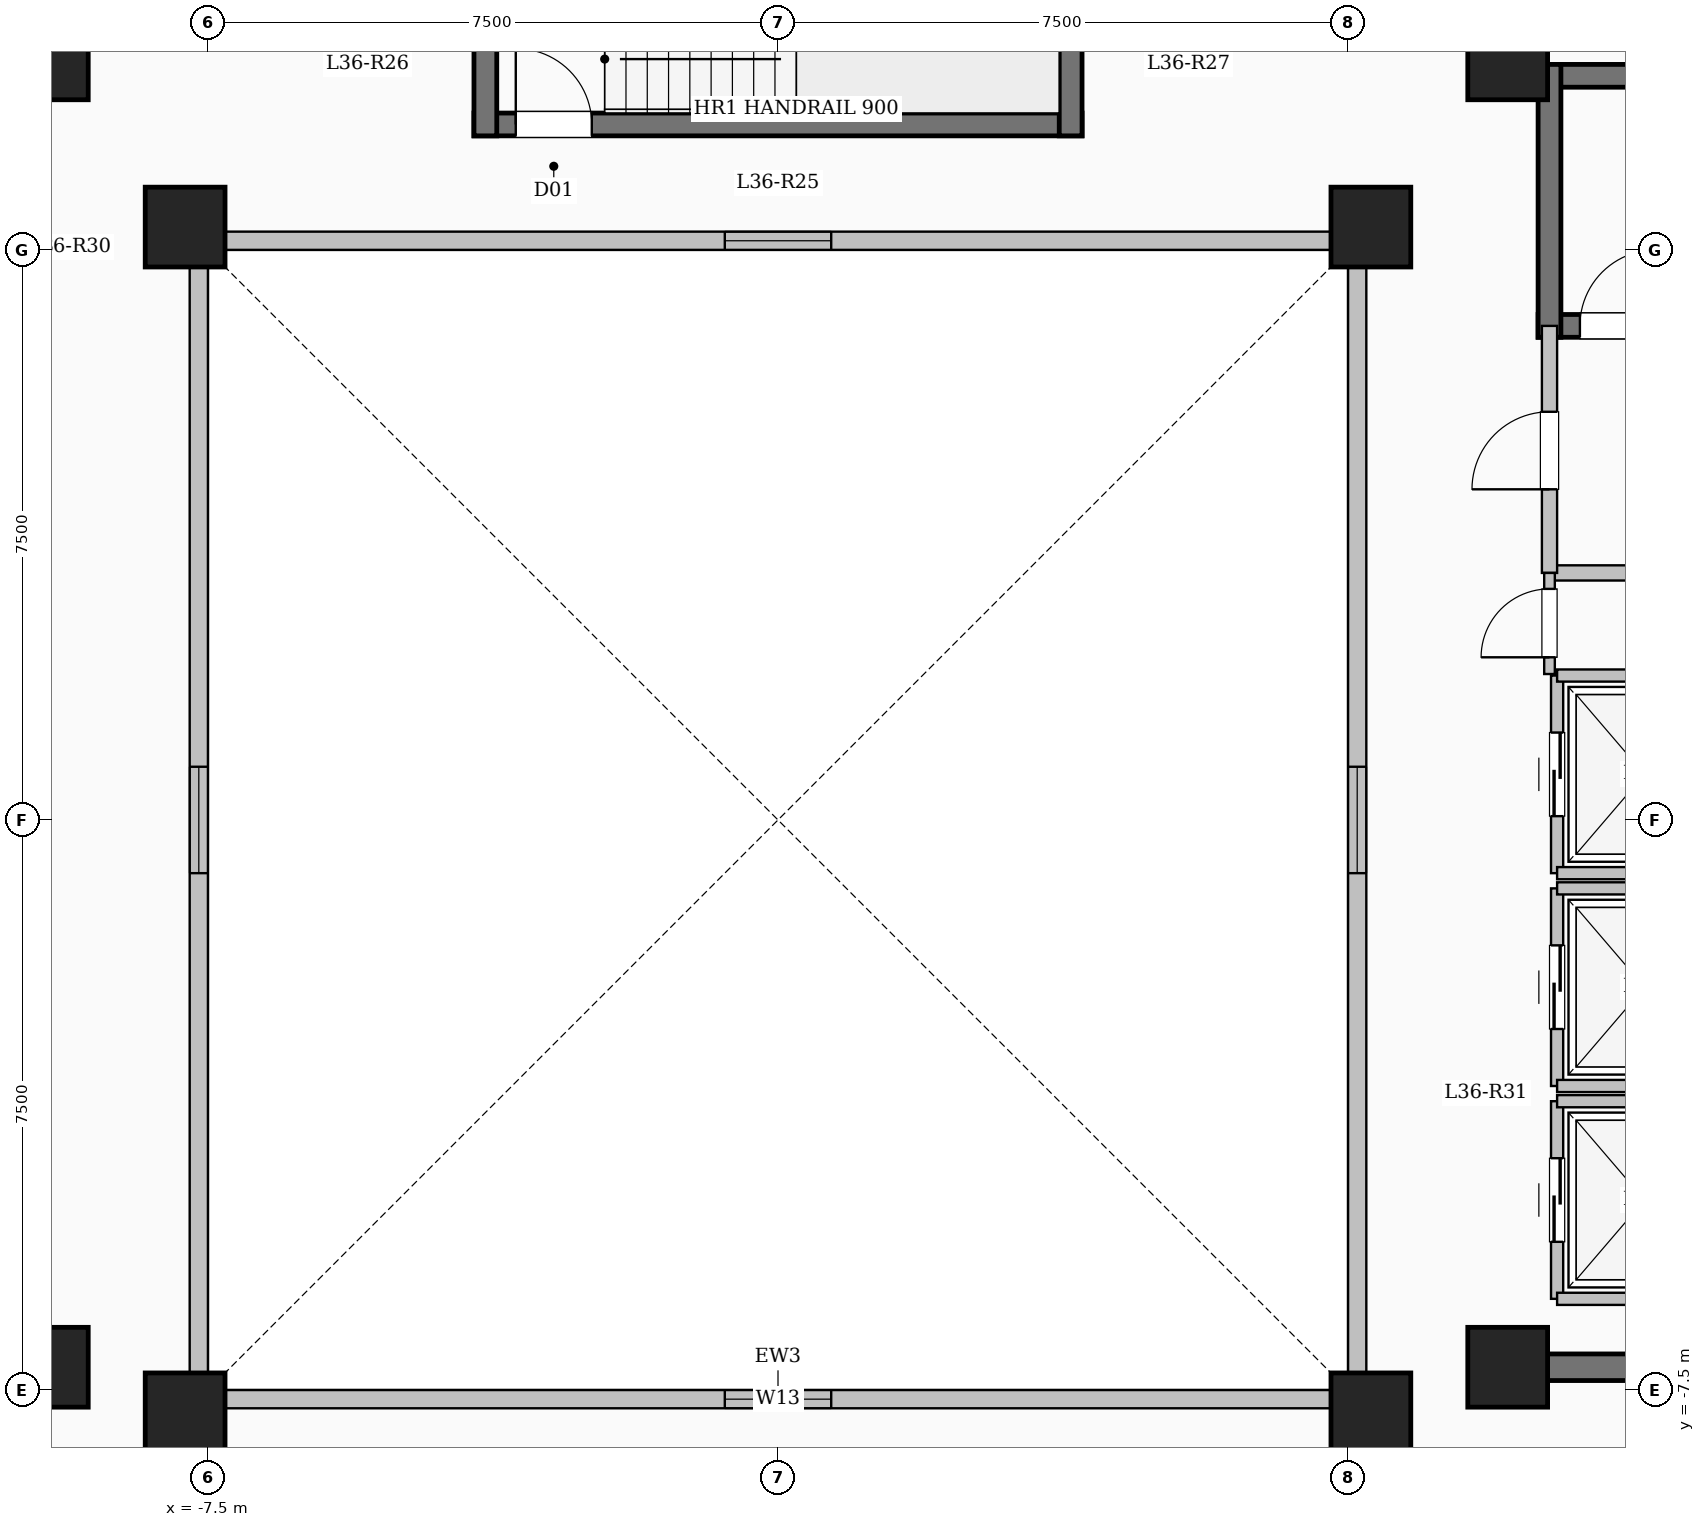
"""IFC4 building model, lengths in metres.
Left out: names, types, materials, properties, quantities, classifications, styles, units other than length and angle.
Written with IfcOpenShell. Run it as: python <this file> out.ifc"""

import sys

from ifc_helpers import new_model, si_unit, direction, frame, frame_2d, origin, origin_2d, place, context, subcontext, project, spatial, rectangle, extrude, element, fill, save


model = new_model("IFC4")
c1 = context("Model", 3, precision=1e-05, world=origin(), true_north=direction((0.0, 1.0)))
c2 = subcontext(c1, "Body", "Model", "MODEL_VIEW")
j1 = project(units=[si_unit("LENGTHUNIT", "METRE"), si_unit("PLANEANGLEUNIT", "RADIAN")], contexts=[c1])
p1 = place(None, origin())
s1 = spatial("IfcSite", under=j1, at=p1, CompositionType="ELEMENT")
p2 = place(p1, origin())
s2 = spatial("IfcBuilding", under=s1, at=p2, CompositionType="ELEMENT")
p3 = place(p2, frame((0.0, 0.0, 135.95)))
s3 = spatial("IfcBuildingStorey", under=s2, at=p3, CompositionType="ELEMENT", Elevation=135.95)
for number, where, z_axis, x_axis in (
    (1, (-7.8, -7.8, 0.0), (0.0, 0.0, 1.0), (1.0, 0.0, 0.0)),
    (2, (7.8, -7.8, 0.0), (0.0, 0.0, 1.0), (1.0, 0.0, 0.0)),
    (3, (-7.8, 7.8, 0.0), (0.0, 0.0, 1.0), (1.0, 0.0, 0.0)),
    (4, (7.8, 7.8, 0.0), (0.0, 0.0, 1.0), (1.0, 0.0, 0.0)),
    (5, (-9.6, -7.2, 0.0), (0.0, 0.0, 1.0), (1.0, 0.0, 0.0)),
    (6, (-9.6, 10.0, 0.0), (0.0, 0.0, 1.0), (1.0, 0.0, 0.0)),
    (7, (9.6, -7.2, 0.0), (0.0, 0.0, 1.0), (1.0, 0.0, 0.0)),
    (8, (9.6, 10.0, 0.0), (0.0, 0.0, 1.0), (1.0, 0.0, 0.0)),
):
    element("IfcColumn", number, at=place(p3, frame(where, z_axis=z_axis, x_axis=x_axis)), inside=s3, PredefinedType="COLUMN", context=c2, shape_type="SweptSolid", body=[
        extrude(rectangle(XDim=1.05, YDim=1.05, at=origin_2d()), origin(), (0.0, 0.0, 1.0), 3.35),
    ])
p4 = place(p3, frame((-7.62, -7.62, 0.0), z_axis=(0.0, 0.0, 1.0), x_axis=(1.0, 0.0, 0.0)))
e9 = element("IfcWall", 9, at=p4, inside=s3, PredefinedType="SOLIDWALL", context=c2, shape_type="SweptSolid", body=[
    extrude(rectangle(XDim=15.24, YDim=0.24, at=frame_2d((7.62, 0.0))), origin(), (0.0, 0.0, 1.0), 3.1),
])
p5 = place(p4, frame((6.92, 0.0, 0.95)))
e10 = element("IfcOpeningElement", 10, at=p5, cuts=e9, PredefinedType="OPENING", context=c2, shape_type="SweptSolid", body=[
    extrude(rectangle(XDim=1.4, YDim=1.5, at=frame_2d((0.7, 0.75))), frame((0.0, 0.13, 0.0), z_axis=(0.0, -1.0, 0.0), x_axis=(1.0, 0.0, 0.0)), (0.0, 0.0, 1.0), 0.26),
])
p6 = place(p3, frame((7.62, -7.62, 0.0), z_axis=(0.0, 0.0, 1.0), x_axis=(0.0, 1.0, 0.0)))
e11 = element("IfcWall", 11, at=p6, inside=s3, PredefinedType="SOLIDWALL", context=c2, shape_type="SweptSolid", body=[
    extrude(rectangle(XDim=15.24, YDim=0.24, at=frame_2d((7.62, 0.0))), origin(), (0.0, 0.0, 1.0), 3.1),
])
p7 = place(p6, frame((6.92, 0.0, 0.95)))
e12 = element("IfcOpeningElement", 12, at=p7, cuts=e11, PredefinedType="OPENING", context=c2, shape_type="SweptSolid", body=[
    extrude(rectangle(XDim=1.4, YDim=1.5, at=frame_2d((0.7, 0.75))), frame((0.0, 0.13, 0.0), z_axis=(0.0, -1.0, 0.0), x_axis=(1.0, 0.0, 0.0)), (0.0, 0.0, 1.0), 0.26),
])
p8 = place(p3, frame((7.62, 7.62, 0.0), z_axis=(0.0, 0.0, 1.0), x_axis=(-1.0, 0.0, 0.0)))
e13 = element("IfcWall", 13, at=p8, inside=s3, PredefinedType="SOLIDWALL", context=c2, shape_type="SweptSolid", body=[
    extrude(rectangle(XDim=15.24, YDim=0.24, at=frame_2d((7.62, 0.0))), origin(), (0.0, 0.0, 1.0), 3.1),
])
p9 = place(p8, frame((6.92, 0.0, 0.95)))
e14 = element("IfcOpeningElement", 14, at=p9, cuts=e13, PredefinedType="OPENING", context=c2, shape_type="SweptSolid", body=[
    extrude(rectangle(XDim=1.4, YDim=1.5, at=frame_2d((0.7, 0.75))), frame((0.0, 0.13, 0.0), z_axis=(0.0, -1.0, 0.0), x_axis=(1.0, 0.0, 0.0)), (0.0, 0.0, 1.0), 0.26),
])
p10 = place(p3, frame((-7.62, 7.62, 0.0), z_axis=(0.0, 0.0, 1.0), x_axis=(0.0, -1.0, 0.0)))
e15 = element("IfcWall", 15, at=p10, inside=s3, PredefinedType="SOLIDWALL", context=c2, shape_type="SweptSolid", body=[
    extrude(rectangle(XDim=15.24, YDim=0.24, at=frame_2d((7.62, 0.0))), origin(), (0.0, 0.0, 1.0), 3.1),
])
p11 = place(p10, frame((6.92, 0.0, 0.95)))
e16 = element("IfcOpeningElement", 16, at=p11, cuts=e15, PredefinedType="OPENING", context=c2, shape_type="SweptSolid", body=[
    extrude(rectangle(XDim=1.4, YDim=1.5, at=frame_2d((0.7, 0.75))), frame((0.0, 0.13, 0.0), z_axis=(0.0, -1.0, 0.0), x_axis=(1.0, 0.0, 0.0)), (0.0, 0.0, 1.0), 0.26),
])
p12 = place(p3, frame((10.0, 9.79, 0.0), z_axis=(0.0, 0.0, 1.0), x_axis=(1.0, 0.0, 0.0)))
e17 = element("IfcWall", 17, at=p12, inside=s3, PredefinedType="SHEAR", context=c2, shape_type="SweptSolid", body=[
    extrude(rectangle(XDim=8.0, YDim=0.3, at=frame_2d((4.0, 0.0))), origin(), (0.0, 0.0, 1.0), 3.35),
])
p13 = place(p3, frame((10.0, 6.5, 0.0), z_axis=(0.0, 0.0, 1.0), x_axis=(1.0, 0.0, 0.0)))
e18 = element("IfcWall", 18, at=p13, inside=s3, PredefinedType="SHEAR", context=c2, shape_type="SweptSolid", body=[
    extrude(rectangle(XDim=8.0, YDim=0.3, at=frame_2d((4.0, 0.0))), origin(), (0.0, 0.0, 1.0), 3.35),
])
p14 = place(p13, frame((0.55, 0.0, 0.0)))
e19 = element("IfcOpeningElement", 19, at=p14, cuts=e18, PredefinedType="OPENING", context=c2, shape_type="SweptSolid", body=[
    extrude(rectangle(XDim=1.0, YDim=2.15, at=frame_2d((0.5, 1.075))), frame((0.0, 0.16, 0.0), z_axis=(0.0, -1.0, 0.0), x_axis=(1.0, 0.0, 0.0)), (0.0, 0.0, 1.0), 0.32),
])
p15 = place(p3, frame((10.15, 6.35, 0.0), z_axis=(0.0, 0.0, 1.0), x_axis=(0.0, 1.0, 0.0)))
e20 = element("IfcWall", 20, at=p15, inside=s3, PredefinedType="SHEAR", context=c2, shape_type="SweptSolid", body=[
    extrude(rectangle(XDim=3.59, YDim=0.3, at=frame_2d((1.795, 0.0))), origin(), (0.0, 0.0, 1.0), 3.35),
])
p16 = place(p3, frame((-4.0, 9.15, 0.0), z_axis=(0.0, 0.0, 1.0), x_axis=(1.0, 0.0, 0.0)))
e21 = element("IfcWall", 21, at=p16, inside=s3, PredefinedType="SHEAR", context=c2, shape_type="SweptSolid", body=[
    extrude(rectangle(XDim=8.0, YDim=0.3, at=frame_2d((4.0, 0.0))), origin(), (0.0, 0.0, 1.0), 3.35),
])
p17 = place(p16, frame((0.55, 0.0, 0.0)))
e22 = element("IfcOpeningElement", 22, at=p17, cuts=e21, PredefinedType="OPENING", context=c2, shape_type="SweptSolid", body=[
    extrude(rectangle(XDim=1.0, YDim=2.15, at=frame_2d((0.5, 1.075))), frame((0.0, 0.16, 0.0), z_axis=(0.0, -1.0, 0.0), x_axis=(1.0, 0.0, 0.0)), (0.0, 0.0, 1.0), 0.32),
])
for number, where, z_axis, x_axis in (
    (23, (-3.85, 9.0, 0.0), (0.0, 0.0, 1.0), (0.0, 1.0, 0.0)),
    (24, (3.85, 9.0, 0.0), (0.0, 0.0, 1.0), (0.0, 1.0, 0.0)),
):
    element("IfcWall", number, at=place(p3, frame(where, z_axis=z_axis, x_axis=x_axis)), inside=s3, PredefinedType="SHEAR", context=c2, shape_type="SweptSolid", body=[
        extrude(rectangle(XDim=3.59, YDim=0.3, at=frame_2d((1.795, 0.0))), origin(), (0.0, 0.0, 1.0), 3.35),
    ])
p18 = place(p3, frame((10.15, 3.25, 0.0), z_axis=(0.0, 0.0, 1.0), x_axis=(1.0, 0.0, 0.0)))
e25 = element("IfcWall", 25, at=p18, inside=s3, PredefinedType="SOLIDWALL", context=c2, shape_type="SweptSolid", body=[
    extrude(rectangle(XDim=5.4, YDim=0.2, at=frame_2d((2.7, 0.0))), origin(), (0.0, 0.0, 1.0), 3.1),
])
p19 = place(p3, frame((10.15, 3.25, 0.0), z_axis=(0.0, 0.0, 1.0), x_axis=(0.0, 1.0, 0.0)))
e26 = element("IfcWall", 26, at=p19, inside=s3, PredefinedType="SOLIDWALL", context=c2, shape_type="SweptSolid", body=[
    extrude(rectangle(XDim=3.25, YDim=0.2, at=frame_2d((1.625, 0.0))), origin(), (0.0, 0.0, 1.0), 3.1),
])
p20 = place(p19, frame((1.1, 0.0, 0.0)))
e27 = element("IfcOpeningElement", 27, at=p20, cuts=e26, PredefinedType="OPENING", context=c2, shape_type="SweptSolid", body=[
    extrude(rectangle(XDim=1.02, YDim=2.15, at=frame_2d((0.51, 1.075))), frame((0.0, 0.11, 0.0), z_axis=(0.0, -1.0, 0.0), x_axis=(1.0, 0.0, 0.0)), (0.0, 0.0, 1.0), 0.22),
])
p21 = place(p3, frame((10.25, -6.3, 0.0), z_axis=(0.0, 0.0, 1.0), x_axis=(0.0, 1.0, 0.0)))
e28 = element("IfcWall", 28, at=p21, inside=s3, PredefinedType="SOLIDWALL", context=c2, shape_type="SweptSolid", body=[
    extrude(rectangle(XDim=2.6, YDim=0.16, at=frame_2d((1.3, 0.0))), origin(), (0.0, 0.0, 1.0), 3.1),
])
p22 = place(p21, frame((0.75, 0.0, 0.0)))
e29 = element("IfcOpeningElement", 29, at=p22, cuts=e28, PredefinedType="OPENING", context=c2, shape_type="SweptSolid", body=[
    extrude(rectangle(XDim=1.1, YDim=2.15, at=frame_2d((0.55, 1.075))), frame((0.0, 0.09, 0.0), z_axis=(0.0, -1.0, 0.0), x_axis=(1.0, 0.0, 0.0)), (0.0, 0.0, 1.0), 0.18),
])
for number, where, z_axis, x_axis in (
    (30, (10.25, -6.3, 0.0), (0.0, 0.0, 1.0), (1.0, 0.0, 0.0)),
    (31, (10.25, -3.7, 0.0), (0.0, 0.0, 1.0), (1.0, 0.0, 0.0)),
):
    element("IfcWall", number, at=place(p3, frame(where, z_axis=z_axis, x_axis=x_axis)), inside=s3, PredefinedType="SOLIDWALL", context=c2, shape_type="SweptSolid", body=[
        extrude(rectangle(XDim=2.3, YDim=0.16, at=frame_2d((1.15, 0.0))), origin(), (0.0, 0.0, 1.0), 3.1),
    ])
p23 = place(p3, frame((10.25, -3.5, 0.0), z_axis=(0.0, 0.0, 1.0), x_axis=(0.0, 1.0, 0.0)))
e32 = element("IfcWall", 32, at=p23, inside=s3, PredefinedType="SOLIDWALL", context=c2, shape_type="SweptSolid", body=[
    extrude(rectangle(XDim=2.6, YDim=0.16, at=frame_2d((1.3, 0.0))), origin(), (0.0, 0.0, 1.0), 3.1),
])
p24 = place(p23, frame((0.75, 0.0, 0.0)))
e33 = element("IfcOpeningElement", 33, at=p24, cuts=e32, PredefinedType="OPENING", context=c2, shape_type="SweptSolid", body=[
    extrude(rectangle(XDim=1.1, YDim=2.15, at=frame_2d((0.55, 1.075))), frame((0.0, 0.09, 0.0), z_axis=(0.0, -1.0, 0.0), x_axis=(1.0, 0.0, 0.0)), (0.0, 0.0, 1.0), 0.18),
])
for number, where, z_axis, x_axis in (
    (34, (10.25, -3.5, 0.0), (0.0, 0.0, 1.0), (1.0, 0.0, 0.0)),
    (35, (10.25, -0.9, 0.0), (0.0, 0.0, 1.0), (1.0, 0.0, 0.0)),
):
    element("IfcWall", number, at=place(p3, frame(where, z_axis=z_axis, x_axis=x_axis)), inside=s3, PredefinedType="SOLIDWALL", context=c2, shape_type="SweptSolid", body=[
        extrude(rectangle(XDim=2.3, YDim=0.16, at=frame_2d((1.15, 0.0))), origin(), (0.0, 0.0, 1.0), 3.1),
    ])
p25 = place(p3, frame((10.25, -0.7, 0.0), z_axis=(0.0, 0.0, 1.0), x_axis=(0.0, 1.0, 0.0)))
e36 = element("IfcWall", 36, at=p25, inside=s3, PredefinedType="SOLIDWALL", context=c2, shape_type="SweptSolid", body=[
    extrude(rectangle(XDim=2.6, YDim=0.16, at=frame_2d((1.3, 0.0))), origin(), (0.0, 0.0, 1.0), 3.1),
])
p26 = place(p25, frame((0.75, 0.0, 0.0)))
e37 = element("IfcOpeningElement", 37, at=p26, cuts=e36, PredefinedType="OPENING", context=c2, shape_type="SweptSolid", body=[
    extrude(rectangle(XDim=1.1, YDim=2.15, at=frame_2d((0.55, 1.075))), frame((0.0, 0.09, 0.0), z_axis=(0.0, -1.0, 0.0), x_axis=(1.0, 0.0, 0.0)), (0.0, 0.0, 1.0), 0.18),
])
for number, where, z_axis, x_axis in (
    (38, (10.25, -0.7, 0.0), (0.0, 0.0, 1.0), (1.0, 0.0, 0.0)),
    (39, (10.25, 1.9, 0.0), (0.0, 0.0, 1.0), (1.0, 0.0, 0.0)),
):
    element("IfcWall", number, at=place(p3, frame(where, z_axis=z_axis, x_axis=x_axis)), inside=s3, PredefinedType="SOLIDWALL", context=c2, shape_type="SweptSolid", body=[
        extrude(rectangle(XDim=2.3, YDim=0.16, at=frame_2d((1.15, 0.0))), origin(), (0.0, 0.0, 1.0), 3.1),
    ])
p27 = place(p3, frame((10.075, -7.2, 0.0), z_axis=(0.0, 0.0, 1.0), x_axis=(1.0, 0.0, 0.0)))
e40 = element("IfcWall", 40, at=p27, inside=s3, PredefinedType="SHEAR", context=c2, shape_type="SweptSolid", body=[
    extrude(rectangle(XDim=8.55, YDim=0.35, at=frame_2d((4.275, 0.0))), origin(), (0.0, 0.0, 1.0), 3.35),
])
p28 = place(p3, frame((10.15, 1.92, 0.0), z_axis=(0.0, 0.0, 1.0), x_axis=(0.0, 1.0, 0.0)))
e41 = element("IfcWall", 41, at=p28, inside=s3, PredefinedType="PARTITIONING", context=c2, shape_type="SweptSolid", body=[
    extrude(rectangle(XDim=1.33, YDim=0.14, at=frame_2d((0.665, 0.0))), origin(), (0.0, 0.0, 1.0), 3.1),
])
p29 = place(p28, frame((0.22, 0.0, 0.0)))
e42 = element("IfcOpeningElement", 42, at=p29, cuts=e41, PredefinedType="OPENING", context=c2, shape_type="SweptSolid", body=[
    extrude(rectangle(XDim=0.9, YDim=2.08, at=frame_2d((0.45, 1.04))), frame((0.0, 0.08, 0.0), z_axis=(0.0, -1.0, 0.0), x_axis=(1.0, 0.0, 0.0)), (0.0, 0.0, 1.0), 0.16),
])
p30 = place(p5, origin())
e43 = element("IfcWindow", 43, at=p30, inside=s3, PartitioningType="SINGLE_PANEL", PredefinedType="WINDOW", context=c2, shape_type="SweptSolid", body=[
    extrude(rectangle(XDim=1.4, YDim=1.5, at=frame_2d((0.7, 0.75))), frame((0.0, 0.03, 0.0), z_axis=(0.0, -1.0, 0.0), x_axis=(1.0, 0.0, 0.0)), (0.0, 0.0, 1.0), 0.06),
])
fill(e10, e43)
p31 = place(p7, origin())
e44 = element("IfcWindow", 44, at=p31, inside=s3, PartitioningType="SINGLE_PANEL", PredefinedType="WINDOW", context=c2, shape_type="SweptSolid", body=[
    extrude(rectangle(XDim=1.4, YDim=1.5, at=frame_2d((0.7, 0.75))), frame((0.0, 0.03, 0.0), z_axis=(0.0, -1.0, 0.0), x_axis=(1.0, 0.0, 0.0)), (0.0, 0.0, 1.0), 0.06),
])
fill(e12, e44)
p32 = place(p9, origin())
e45 = element("IfcWindow", 45, at=p32, inside=s3, PartitioningType="SINGLE_PANEL", PredefinedType="WINDOW", context=c2, shape_type="SweptSolid", body=[
    extrude(rectangle(XDim=1.4, YDim=1.5, at=frame_2d((0.7, 0.75))), frame((0.0, 0.03, 0.0), z_axis=(0.0, -1.0, 0.0), x_axis=(1.0, 0.0, 0.0)), (0.0, 0.0, 1.0), 0.06),
])
fill(e14, e45)
p33 = place(p11, origin())
e46 = element("IfcWindow", 46, at=p33, inside=s3, PartitioningType="SINGLE_PANEL", PredefinedType="WINDOW", context=c2, shape_type="SweptSolid", body=[
    extrude(rectangle(XDim=1.4, YDim=1.5, at=frame_2d((0.7, 0.75))), frame((0.0, 0.03, 0.0), z_axis=(0.0, -1.0, 0.0), x_axis=(1.0, 0.0, 0.0)), (0.0, 0.0, 1.0), 0.06),
])
fill(e16, e46)
p34 = place(p14, origin())
e47 = element("IfcDoor", 47, at=p34, inside=s3, OperationType="SINGLE_SWING_RIGHT", PredefinedType="DOOR", context=c2, shape_type="SweptSolid", body=[
    extrude(rectangle(XDim=1.0, YDim=2.15, at=frame_2d((0.5, 1.075))), frame((0.0, 0.025, 0.0), z_axis=(0.0, -1.0, 0.0), x_axis=(1.0, 0.0, 0.0)), (0.0, 0.0, 1.0), 0.05),
])
fill(e19, e47)
p35 = place(p17, origin())
e48 = element("IfcDoor", 48, at=p35, inside=s3, OperationType="SINGLE_SWING_LEFT", PredefinedType="DOOR", context=c2, shape_type="SweptSolid", body=[
    extrude(rectangle(XDim=1.0, YDim=2.15, at=frame_2d((0.5, 1.075))), frame((0.0, 0.025, 0.0), z_axis=(0.0, -1.0, 0.0), x_axis=(1.0, 0.0, 0.0)), (0.0, 0.0, 1.0), 0.05),
])
fill(e22, e48)
p36 = place(p20, origin())
e49 = element("IfcDoor", 49, at=p36, inside=s3, OperationType="SINGLE_SWING_LEFT", PredefinedType="DOOR", context=c2, shape_type="SweptSolid", body=[
    extrude(rectangle(XDim=1.02, YDim=2.15, at=frame_2d((0.51, 1.075))), frame((0.0, 0.025, 0.0), z_axis=(0.0, -1.0, 0.0), x_axis=(1.0, 0.0, 0.0)), (0.0, 0.0, 1.0), 0.05),
])
fill(e27, e49)
p37 = place(p22, origin())
e50 = element("IfcDoor", 50, at=p37, inside=s3, OperationType="SLIDING_TO_LEFT", PredefinedType="DOOR", context=c2, shape_type="SweptSolid", body=[
    extrude(rectangle(XDim=1.1, YDim=2.15, at=frame_2d((0.55, 1.075))), frame((0.0, 0.025, 0.0), z_axis=(0.0, -1.0, 0.0), x_axis=(1.0, 0.0, 0.0)), (0.0, 0.0, 1.0), 0.05),
])
fill(e29, e50)
p38 = place(p24, origin())
e51 = element("IfcDoor", 51, at=p38, inside=s3, OperationType="SLIDING_TO_LEFT", PredefinedType="DOOR", context=c2, shape_type="SweptSolid", body=[
    extrude(rectangle(XDim=1.1, YDim=2.15, at=frame_2d((0.55, 1.075))), frame((0.0, 0.025, 0.0), z_axis=(0.0, -1.0, 0.0), x_axis=(1.0, 0.0, 0.0)), (0.0, 0.0, 1.0), 0.05),
])
fill(e33, e51)
p39 = place(p26, origin())
e52 = element("IfcDoor", 52, at=p39, inside=s3, OperationType="SLIDING_TO_LEFT", PredefinedType="DOOR", context=c2, shape_type="SweptSolid", body=[
    extrude(rectangle(XDim=1.1, YDim=2.15, at=frame_2d((0.55, 1.075))), frame((0.0, 0.025, 0.0), z_axis=(0.0, -1.0, 0.0), x_axis=(1.0, 0.0, 0.0)), (0.0, 0.0, 1.0), 0.05),
])
fill(e37, e52)
p40 = place(p29, origin())
e53 = element("IfcDoor", 53, at=p40, inside=s3, OperationType="SINGLE_SWING_LEFT", PredefinedType="DOOR", context=c2, shape_type="SweptSolid", body=[
    extrude(rectangle(XDim=0.9, YDim=2.08, at=frame_2d((0.45, 1.04))), frame((0.0, 0.025, 0.0), z_axis=(0.0, -1.0, 0.0), x_axis=(1.0, 0.0, 0.0)), (0.0, 0.0, 1.0), 0.05),
])
fill(e42, e53)
save(model, sys.argv[1])
